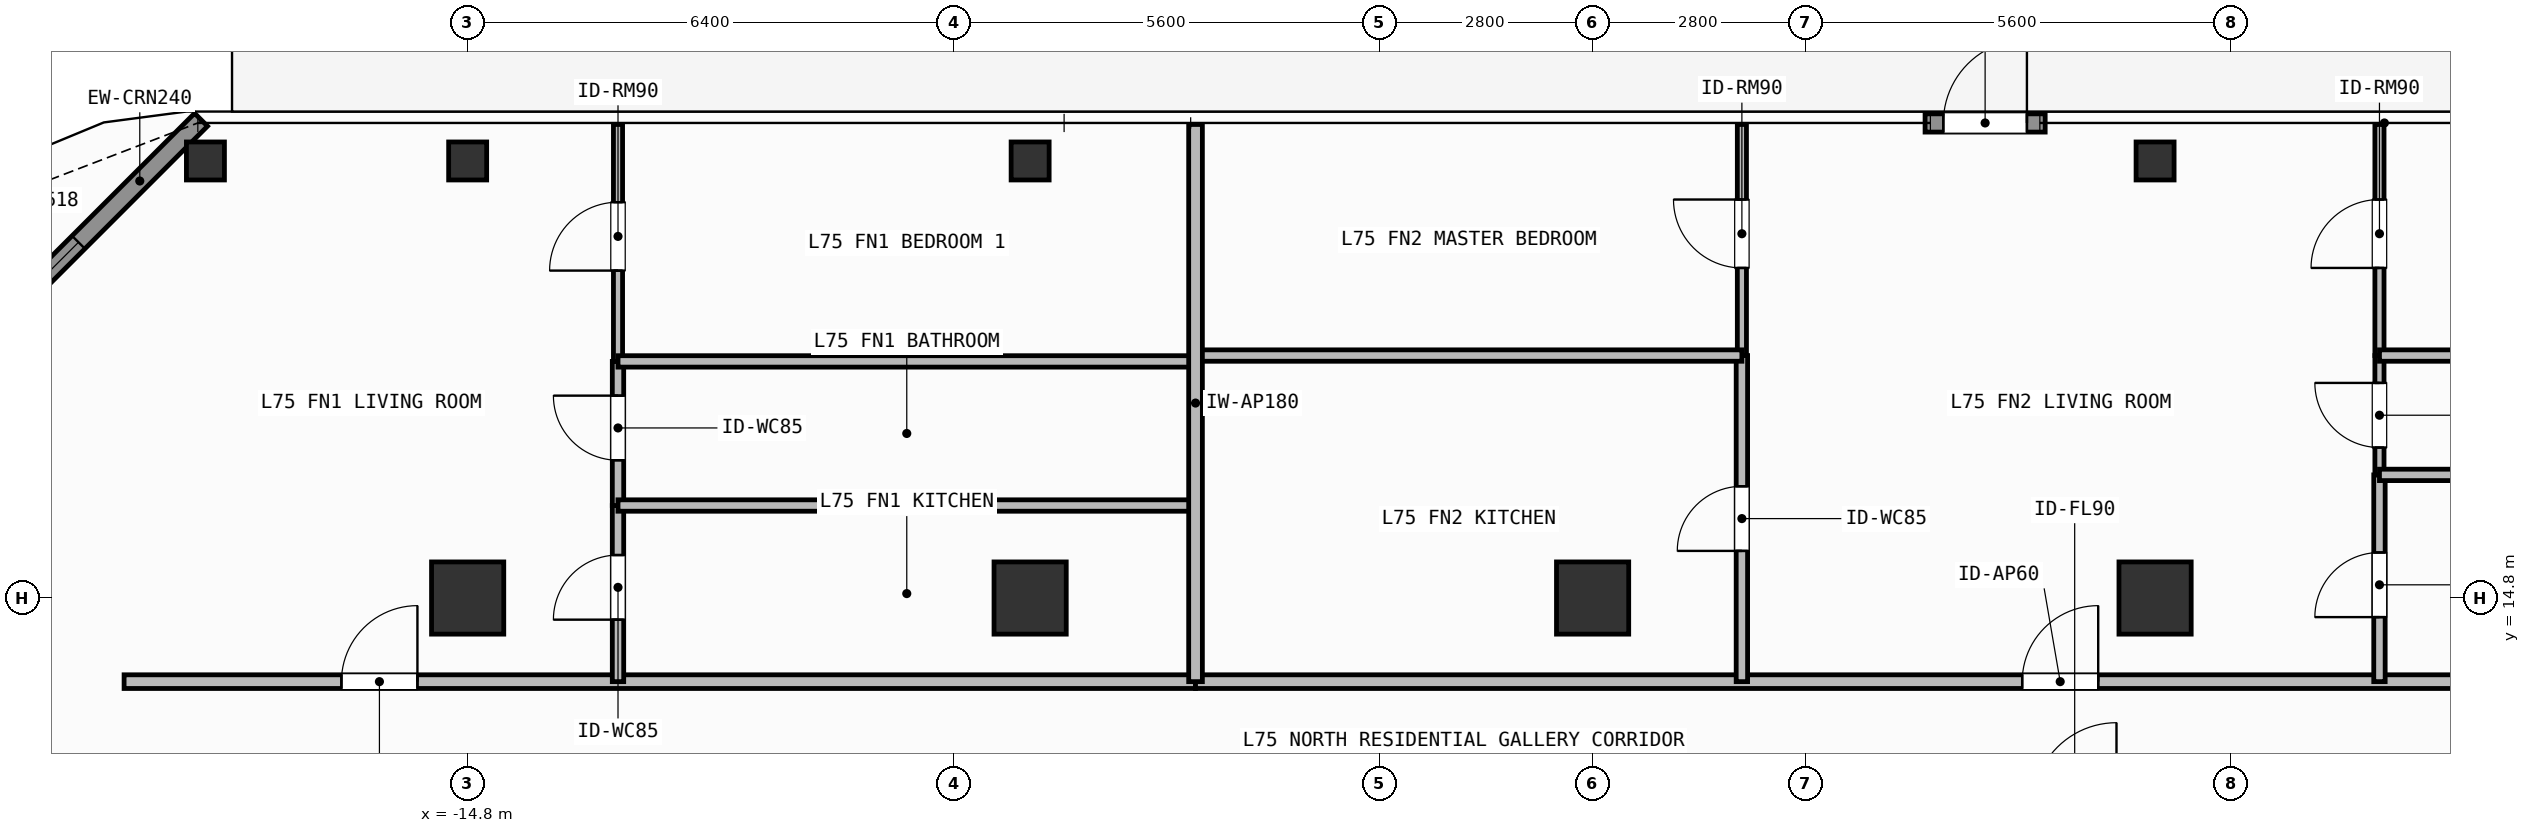
"""IFC4 building model, lengths in metres.
Left out: names, types, materials, properties, quantities, classifications, styles, units other than length and angle.
Written with IfcOpenShell. Run it as: python <this file> out.ifc"""

import sys

from ifc_helpers import new_model, si_unit, direction, frame, frame_2d, origin, origin_2d, place, context, subcontext, project, spatial, rectangle, hollow_rectangle, extrude, element, fill, save


model = new_model("IFC4")
c1 = context("Model", 3, precision=1e-05, world=origin(), true_north=direction((0.0, 1.0)))
c2 = subcontext(c1, "Body", "Model", "MODEL_VIEW")
j1 = project(units=[si_unit("LENGTHUNIT", "METRE"), si_unit("PLANEANGLEUNIT", "RADIAN")], contexts=[c1])
p1 = place(None, origin())
s1 = spatial("IfcSite", under=j1, at=p1, CompositionType="ELEMENT")
p2 = place(p1, origin())
s2 = spatial("IfcBuilding", under=s1, at=p2, CompositionType="ELEMENT")
p3 = place(p2, frame((0.0, 0.0, 305.4)))
s3 = spatial("IfcBuildingStorey", under=s2, at=p3, CompositionType="ELEMENT", Elevation=305.4)
for number, where, z_axis, x_axis in (
    (1, (-14.8, 14.8, 0.0), (0.0, 0.0, 1.0), (1.0, 0.0, 0.0)),
    (2, (-7.4, 14.8, 0.0), (0.0, 0.0, 1.0), (1.0, 0.0, 0.0)),
    (3, (0.0, 14.8, 0.0), (0.0, 0.0, 1.0), (1.0, 0.0, 0.0)),
    (4, (7.4, 14.8, 0.0), (0.0, 0.0, 1.0), (1.0, 0.0, 0.0)),
):
    element("IfcColumn", number, at=place(p3, frame(where, z_axis=z_axis, x_axis=x_axis)), inside=s3, PredefinedType="COLUMN", context=c2, shape_type="SweptSolid", body=[
        extrude(rectangle(XDim=0.95, YDim=0.95, at=origin_2d()), origin(), (0.0, 0.0, 1.0), 3.9),
    ])
for number, where, z_axis, x_axis in (
    (5, (-18.25, 20.55, 0.0), (0.0, 0.0, 1.0), (1.0, 0.0, 0.0)),
    (6, (-14.8, 20.55, 0.0), (0.0, 0.0, 1.0), (1.0, 0.0, 0.0)),
    (7, (-7.4, 20.55, 0.0), (0.0, 0.0, 1.0), (1.0, 0.0, 0.0)),
    (8, (7.4, 20.55, 0.0), (0.0, 0.0, 1.0), (1.0, 0.0, 0.0)),
):
    element("IfcColumn", number, at=place(p3, frame(where, z_axis=z_axis, x_axis=x_axis)), inside=s3, PredefinedType="COLUMN", context=c2, shape_type="SweptSolid", body=[
        extrude(hollow_rectangle(XDim=0.5, YDim=0.5, WallThickness=0.025, at=origin_2d()), origin(), (0.0, 0.0, 1.0), 3.9),
    ])
p4 = place(p3, frame((4.374, 21.05, 0.0), z_axis=(0.0, 0.0, 1.0), x_axis=(1.0, 0.0, 0.0)))
e9 = element("IfcWall", 9, at=p4, inside=s3, PredefinedType="SOLIDWALL", context=c2, shape_type="SweptSolid", body=[
    extrude(rectangle(XDim=1.58, YDim=0.24, at=frame_2d((0.79, 0.0))), origin(), (0.0, 0.0, 1.0), 3.68),
])
p5 = place(p4, frame((0.24, 0.0, 0.0)))
e10 = element("IfcOpeningElement", 10, at=p5, cuts=e9, PredefinedType="OPENING", context=c2, shape_type="SweptSolid", body=[
    extrude(rectangle(XDim=1.1, YDim=2.2, at=frame_2d((0.55, 1.1))), frame((0.0, 0.13, 0.0), z_axis=(0.0, -1.0, 0.0), x_axis=(1.0, 0.0, 0.0)), (0.0, 0.0, 1.0), 0.26),
])
p6 = place(p3, frame((-22.592, 16.808, 0.0), z_axis=(0.0, 0.0, 1.0), x_axis=(0.707106781187, 0.707106781187, 0.0)))
e11 = element("IfcWall", 11, at=p6, inside=s3, PredefinedType="SOLIDWALL", context=c2, shape_type="SweptSolid", body=[
    extrude(rectangle(XDim=6.059, YDim=0.24, at=frame_2d((3.03, 0.0))), origin(), (0.0, 0.0, 1.0), 3.68),
])
p7 = place(p6, frame((2.28, 0.0, 0.8)))
e12 = element("IfcOpeningElement", 12, at=p7, cuts=e11, PredefinedType="OPENING", context=c2, shape_type="SweptSolid", body=[
    extrude(rectangle(XDim=1.5, YDim=1.85, at=frame_2d((0.75, 0.925))), frame((0.0, 0.13, 0.0), z_axis=(0.0, -1.0, 0.0), x_axis=(1.0, 0.0, 0.0)), (0.0, 0.0, 1.0), 0.26),
])
p8 = place(p3, frame((-19.32, 13.7, 0.0), z_axis=(0.0, 0.0, 1.0), x_axis=(1.0, 0.0, 0.0)))
e13 = element("IfcWall", 13, at=p8, inside=s3, PredefinedType="PARTITIONING", context=c2, shape_type="SweptSolid", body=[
    extrude(rectangle(XDim=14.096, YDim=0.18, at=frame_2d((7.048, 0.0))), origin(), (0.0, 0.0, 1.0), 3.68),
])
p9 = place(p8, frame((2.859, 0.0, 0.0)))
e14 = element("IfcOpeningElement", 14, at=p9, cuts=e13, PredefinedType="OPENING", context=c2, shape_type="SweptSolid", body=[
    extrude(rectangle(XDim=1.0, YDim=2.2, at=frame_2d((0.5, 1.1))), frame((0.0, 0.1, 0.0), z_axis=(0.0, -1.0, 0.0), x_axis=(1.0, 0.0, 0.0)), (0.0, 0.0, 1.0), 0.2),
])
p10 = place(p3, frame((-12.822, 13.7, 0.0), z_axis=(0.0, 0.0, 1.0), x_axis=(0.0, 1.0, 0.0)))
e15 = element("IfcWall", 15, at=p10, inside=s3, PredefinedType="PARTITIONING", context=c2, shape_type="SweptSolid", body=[
    extrude(rectangle(XDim=2.317, YDim=0.15, at=frame_2d((1.159, 0.0))), origin(), (0.0, 0.0, 1.0), 3.68),
])
p11 = place(p10, frame((0.815, 0.0, 0.0)))
e16 = element("IfcOpeningElement", 16, at=p11, cuts=e15, PredefinedType="OPENING", context=c2, shape_type="SweptSolid", body=[
    extrude(rectangle(XDim=0.85, YDim=2.1, at=frame_2d((0.425, 1.05))), frame((0.0, 0.085, 0.0), z_axis=(0.0, -1.0, 0.0), x_axis=(1.0, 0.0, 0.0)), (0.0, 0.0, 1.0), 0.17),
])
p12 = place(p3, frame((-12.822, 16.017, 0.0), z_axis=(0.0, 0.0, 1.0), x_axis=(0.0, 1.0, 0.0)))
e17 = element("IfcWall", 17, at=p12, inside=s3, PredefinedType="PARTITIONING", context=c2, shape_type="SweptSolid", body=[
    extrude(rectangle(XDim=1.896, YDim=0.15, at=frame_2d((0.948, 0.0))), origin(), (0.0, 0.0, 1.0), 3.68),
])
p13 = place(p12, frame((0.596, 0.0, 0.0)))
e18 = element("IfcOpeningElement", 18, at=p13, cuts=e17, PredefinedType="OPENING", context=c2, shape_type="SweptSolid", body=[
    extrude(rectangle(XDim=0.85, YDim=2.1, at=frame_2d((0.425, 1.05))), frame((0.0, 0.085, 0.0), z_axis=(0.0, -1.0, 0.0), x_axis=(1.0, 0.0, 0.0)), (0.0, 0.0, 1.0), 0.17),
])
p14 = place(p3, frame((-12.822, 17.913, 0.0), z_axis=(0.0, 0.0, 1.0), x_axis=(0.0, 1.0, 0.0)))
e19 = element("IfcWall", 19, at=p14, inside=s3, PredefinedType="PARTITIONING", context=c2, shape_type="SweptSolid", body=[
    extrude(rectangle(XDim=3.117, YDim=0.12, at=frame_2d((1.559, 0.0))), origin(), (0.0, 0.0, 1.0), 3.68),
])
p15 = place(p14, frame((1.195, 0.0, 0.0)))
e20 = element("IfcOpeningElement", 20, at=p15, cuts=e19, PredefinedType="OPENING", context=c2, shape_type="SweptSolid", body=[
    extrude(rectangle(XDim=0.9, YDim=2.1, at=frame_2d((0.45, 1.05))), frame((0.0, 0.07, 0.0), z_axis=(0.0, -1.0, 0.0), x_axis=(1.0, 0.0, 0.0)), (0.0, 0.0, 1.0), 0.14),
])
p16 = place(p3, frame((-5.224, 13.7, 0.0), z_axis=(0.0, 0.0, 1.0), x_axis=(1.0, 0.0, 0.0)))
e21 = element("IfcWall", 21, at=p16, inside=s3, PredefinedType="PARTITIONING", context=c2, shape_type="SweptSolid", body=[
    extrude(rectangle(XDim=21.144, YDim=0.18, at=frame_2d((10.572, 0.0))), origin(), (0.0, 0.0, 1.0), 3.68),
])
p17 = place(p16, frame((10.876, 0.0, 0.0)))
e22 = element("IfcOpeningElement", 22, at=p17, cuts=e21, PredefinedType="OPENING", context=c2, shape_type="SweptSolid", body=[
    extrude(rectangle(XDim=1.0, YDim=2.2, at=frame_2d((0.5, 1.1))), frame((0.0, 0.1, 0.0), z_axis=(0.0, -1.0, 0.0), x_axis=(1.0, 0.0, 0.0)), (0.0, 0.0, 1.0), 0.2),
])
p18 = place(p3, frame((1.964, 13.7, 0.0), z_axis=(0.0, 0.0, 1.0), x_axis=(0.0, 1.0, 0.0)))
e23 = element("IfcWall", 23, at=p18, inside=s3, PredefinedType="PARTITIONING", context=c2, shape_type="SweptSolid", body=[
    extrude(rectangle(XDim=4.29, YDim=0.15, at=frame_2d((2.145, 0.0))), origin(), (0.0, 0.0, 1.0), 3.68),
])
p19 = place(p18, frame((1.72, 0.0, 0.0)))
e24 = element("IfcOpeningElement", 24, at=p19, cuts=e23, PredefinedType="OPENING", context=c2, shape_type="SweptSolid", body=[
    extrude(rectangle(XDim=0.85, YDim=2.1, at=frame_2d((0.425, 1.05))), frame((0.0, 0.085, 0.0), z_axis=(0.0, -1.0, 0.0), x_axis=(1.0, 0.0, 0.0)), (0.0, 0.0, 1.0), 0.17),
])
p20 = place(p3, frame((1.964, 17.99, 0.0), z_axis=(0.0, 0.0, 1.0), x_axis=(0.0, 1.0, 0.0)))
e25 = element("IfcWall", 25, at=p20, inside=s3, PredefinedType="PARTITIONING", context=c2, shape_type="SweptSolid", body=[
    extrude(rectangle(XDim=3.04, YDim=0.12, at=frame_2d((1.52, 0.0))), origin(), (0.0, 0.0, 1.0), 3.68),
])
p21 = place(p20, frame((1.153, 0.0, 0.0)))
e26 = element("IfcOpeningElement", 26, at=p21, cuts=e25, PredefinedType="OPENING", context=c2, shape_type="SweptSolid", body=[
    extrude(rectangle(XDim=0.9, YDim=2.1, at=frame_2d((0.45, 1.05))), frame((0.0, 0.07, 0.0), z_axis=(0.0, -1.0, 0.0), x_axis=(1.0, 0.0, 0.0)), (0.0, 0.0, 1.0), 0.14),
])
p22 = place(p3, frame((10.352, 13.7, 0.0), z_axis=(0.0, 0.0, 1.0), x_axis=(0.0, 1.0, 0.0)))
e27 = element("IfcWall", 27, at=p22, inside=s3, PredefinedType="PARTITIONING", context=c2, shape_type="SweptSolid", body=[
    extrude(rectangle(XDim=2.72, YDim=0.15, at=frame_2d((1.36, 0.0))), origin(), (0.0, 0.0, 1.0), 3.68),
])
p23 = place(p22, frame((0.849, 0.0, 0.0)))
e28 = element("IfcOpeningElement", 28, at=p23, cuts=e27, PredefinedType="OPENING", context=c2, shape_type="SweptSolid", body=[
    extrude(rectangle(XDim=0.85, YDim=2.1, at=frame_2d((0.425, 1.05))), frame((0.0, 0.085, 0.0), z_axis=(0.0, -1.0, 0.0), x_axis=(1.0, 0.0, 0.0)), (0.0, 0.0, 1.0), 0.17),
])
p24 = place(p3, frame((10.352, 16.42, 0.0), z_axis=(0.0, 0.0, 1.0), x_axis=(0.0, 1.0, 0.0)))
e29 = element("IfcWall", 29, at=p24, inside=s3, PredefinedType="PARTITIONING", context=c2, shape_type="SweptSolid", body=[
    extrude(rectangle(XDim=1.57, YDim=0.12, at=frame_2d((0.785, 0.0))), origin(), (0.0, 0.0, 1.0), 3.68),
])
p25 = place(p24, frame((0.36, 0.0, 0.0)))
e30 = element("IfcOpeningElement", 30, at=p25, cuts=e29, PredefinedType="OPENING", context=c2, shape_type="SweptSolid", body=[
    extrude(rectangle(XDim=0.85, YDim=2.1, at=frame_2d((0.425, 1.05))), frame((0.0, 0.07, 0.0), z_axis=(0.0, -1.0, 0.0), x_axis=(1.0, 0.0, 0.0)), (0.0, 0.0, 1.0), 0.14),
])
p26 = place(p3, frame((10.352, 17.99, 0.0), z_axis=(0.0, 0.0, 1.0), x_axis=(0.0, 1.0, 0.0)))
e31 = element("IfcWall", 31, at=p26, inside=s3, PredefinedType="PARTITIONING", context=c2, shape_type="SweptSolid", body=[
    extrude(rectangle(XDim=3.04, YDim=0.12, at=frame_2d((1.52, 0.0))), origin(), (0.0, 0.0, 1.0), 3.68),
])
p27 = place(p26, frame((1.153, 0.0, 0.0)))
e32 = element("IfcOpeningElement", 32, at=p27, cuts=e31, PredefinedType="OPENING", context=c2, shape_type="SweptSolid", body=[
    extrude(rectangle(XDim=0.9, YDim=2.1, at=frame_2d((0.45, 1.05))), frame((0.0, 0.07, 0.0), z_axis=(0.0, -1.0, 0.0), x_axis=(1.0, 0.0, 0.0)), (0.0, 0.0, 1.0), 0.14),
])
for number, where, z_axis, x_axis in (
    (33, (-12.822, 16.017, 0.0), (0.0, 0.0, 1.0), (1.0, 0.0, 0.0)),
    (34, (-12.822, 17.913, 0.0), (0.0, 0.0, 1.0), (1.0, 0.0, 0.0)),
):
    element("IfcWall", number, at=place(p3, frame(where, z_axis=z_axis, x_axis=x_axis)), inside=s3, PredefinedType="PARTITIONING", context=c2, shape_type="SweptSolid", body=[
        extrude(rectangle(XDim=7.598, YDim=0.15, at=frame_2d((3.799, 0.0))), origin(), (0.0, 0.0, 1.0), 3.68),
    ])
p28 = place(p3, frame((-5.224, 17.99, 0.0), z_axis=(0.0, 0.0, 1.0), x_axis=(1.0, 0.0, 0.0)))
e35 = element("IfcWall", 35, at=p28, inside=s3, PredefinedType="PARTITIONING", context=c2, shape_type="SweptSolid", body=[
    extrude(rectangle(XDim=7.188, YDim=0.15, at=frame_2d((3.594, 0.0))), origin(), (0.0, 0.0, 1.0), 3.68),
])
for number, where, z_axis, x_axis in (
    (36, (10.352, 16.42, 0.0), (0.0, 0.0, 1.0), (1.0, 0.0, 0.0)),
    (37, (10.352, 17.99, 0.0), (0.0, 0.0, 1.0), (1.0, 0.0, 0.0)),
):
    element("IfcWall", number, at=place(p3, frame(where, z_axis=z_axis, x_axis=x_axis)), inside=s3, PredefinedType="PARTITIONING", context=c2, shape_type="SweptSolid", body=[
        extrude(rectangle(XDim=5.568, YDim=0.15, at=frame_2d((2.784, 0.0))), origin(), (0.0, 0.0, 1.0), 3.68),
    ])
p29 = place(p3, frame((-5.224, 13.7, 0.0), z_axis=(0.0, 0.0, 1.0), x_axis=(0.0, 1.0, 0.0)))
e38 = element("IfcWall", 38, at=p29, inside=s3, PredefinedType="PARTITIONING", context=c2, shape_type="SweptSolid", body=[
    extrude(rectangle(XDim=7.33, YDim=0.18, at=frame_2d((3.665, 0.0))), origin(), (0.0, 0.0, 1.0), 3.68),
])
p30 = place(p5, origin())
e39 = element("IfcDoor", 39, at=p30, inside=s3, OperationType="SINGLE_SWING_RIGHT", PredefinedType="DOOR", context=c2, shape_type="SweptSolid", body=[
    extrude(rectangle(XDim=1.1, YDim=2.2, at=frame_2d((0.55, 1.1))), frame((0.0, 0.025, 0.0), z_axis=(0.0, -1.0, 0.0), x_axis=(1.0, 0.0, 0.0)), (0.0, 0.0, 1.0), 0.05),
])
fill(e10, e39)
p31 = place(p7, origin())
e40 = element("IfcWindow", 40, at=p31, inside=s3, PartitioningType="SINGLE_PANEL", PredefinedType="WINDOW", context=c2, shape_type="SweptSolid", body=[
    extrude(rectangle(XDim=1.5, YDim=1.85, at=frame_2d((0.75, 0.925))), frame((0.0, 0.03, 0.0), z_axis=(0.0, -1.0, 0.0), x_axis=(1.0, 0.0, 0.0)), (0.0, 0.0, 1.0), 0.06),
])
fill(e12, e40)
p32 = place(p9, origin())
e41 = element("IfcDoor", 41, at=p32, inside=s3, OperationType="SINGLE_SWING_RIGHT", PredefinedType="DOOR", context=c2, shape_type="SweptSolid", body=[
    extrude(rectangle(XDim=1.0, YDim=2.2, at=frame_2d((0.5, 1.1))), frame((0.0, 0.025, 0.0), z_axis=(0.0, -1.0, 0.0), x_axis=(1.0, 0.0, 0.0)), (0.0, 0.0, 1.0), 0.05),
])
fill(e14, e41)
p33 = place(p11, origin())
e42 = element("IfcDoor", 42, at=p33, inside=s3, OperationType="SINGLE_SWING_LEFT", PredefinedType="DOOR", context=c2, shape_type="SweptSolid", body=[
    extrude(rectangle(XDim=0.85, YDim=2.1, at=frame_2d((0.425, 1.05))), frame((0.0, 0.025, 0.0), z_axis=(0.0, -1.0, 0.0), x_axis=(1.0, 0.0, 0.0)), (0.0, 0.0, 1.0), 0.05),
])
fill(e16, e42)
p34 = place(p13, origin())
e43 = element("IfcDoor", 43, at=p34, inside=s3, OperationType="SINGLE_SWING_RIGHT", PredefinedType="DOOR", context=c2, shape_type="SweptSolid", body=[
    extrude(rectangle(XDim=0.85, YDim=2.1, at=frame_2d((0.425, 1.05))), frame((0.0, 0.025, 0.0), z_axis=(0.0, -1.0, 0.0), x_axis=(1.0, 0.0, 0.0)), (0.0, 0.0, 1.0), 0.05),
])
fill(e18, e43)
p35 = place(p15, origin())
e44 = element("IfcDoor", 44, at=p35, inside=s3, OperationType="SINGLE_SWING_LEFT", PredefinedType="DOOR", context=c2, shape_type="SweptSolid", body=[
    extrude(rectangle(XDim=0.9, YDim=2.1, at=frame_2d((0.45, 1.05))), frame((0.0, 0.025, 0.0), z_axis=(0.0, -1.0, 0.0), x_axis=(1.0, 0.0, 0.0)), (0.0, 0.0, 1.0), 0.05),
])
fill(e20, e44)
p36 = place(p17, origin())
e45 = element("IfcDoor", 45, at=p36, inside=s3, OperationType="SINGLE_SWING_RIGHT", PredefinedType="DOOR", context=c2, shape_type="SweptSolid", body=[
    extrude(rectangle(XDim=1.0, YDim=2.2, at=frame_2d((0.5, 1.1))), frame((0.0, 0.025, 0.0), z_axis=(0.0, -1.0, 0.0), x_axis=(1.0, 0.0, 0.0)), (0.0, 0.0, 1.0), 0.05),
])
fill(e22, e45)
p37 = place(p19, origin())
e46 = element("IfcDoor", 46, at=p37, inside=s3, OperationType="SINGLE_SWING_LEFT", PredefinedType="DOOR", context=c2, shape_type="SweptSolid", body=[
    extrude(rectangle(XDim=0.85, YDim=2.1, at=frame_2d((0.425, 1.05))), frame((0.0, 0.025, 0.0), z_axis=(0.0, -1.0, 0.0), x_axis=(1.0, 0.0, 0.0)), (0.0, 0.0, 1.0), 0.05),
])
fill(e24, e46)
p38 = place(p21, origin())
e47 = element("IfcDoor", 47, at=p38, inside=s3, OperationType="SINGLE_SWING_RIGHT", PredefinedType="DOOR", context=c2, shape_type="SweptSolid", body=[
    extrude(rectangle(XDim=0.9, YDim=2.1, at=frame_2d((0.45, 1.05))), frame((0.0, 0.025, 0.0), z_axis=(0.0, -1.0, 0.0), x_axis=(1.0, 0.0, 0.0)), (0.0, 0.0, 1.0), 0.05),
])
fill(e26, e47)
p39 = place(p23, origin())
e48 = element("IfcDoor", 48, at=p39, inside=s3, OperationType="SINGLE_SWING_LEFT", PredefinedType="DOOR", context=c2, shape_type="SweptSolid", body=[
    extrude(rectangle(XDim=0.85, YDim=2.1, at=frame_2d((0.425, 1.05))), frame((0.0, 0.025, 0.0), z_axis=(0.0, -1.0, 0.0), x_axis=(1.0, 0.0, 0.0)), (0.0, 0.0, 1.0), 0.05),
])
fill(e28, e48)
p40 = place(p25, origin())
e49 = element("IfcDoor", 49, at=p40, inside=s3, OperationType="SINGLE_SWING_RIGHT", PredefinedType="DOOR", context=c2, shape_type="SweptSolid", body=[
    extrude(rectangle(XDim=0.85, YDim=2.1, at=frame_2d((0.425, 1.05))), frame((0.0, 0.025, 0.0), z_axis=(0.0, -1.0, 0.0), x_axis=(1.0, 0.0, 0.0)), (0.0, 0.0, 1.0), 0.05),
])
fill(e30, e49)
p41 = place(p27, origin())
e50 = element("IfcDoor", 50, at=p41, inside=s3, OperationType="SINGLE_SWING_LEFT", PredefinedType="DOOR", context=c2, shape_type="SweptSolid", body=[
    extrude(rectangle(XDim=0.9, YDim=2.1, at=frame_2d((0.45, 1.05))), frame((0.0, 0.025, 0.0), z_axis=(0.0, -1.0, 0.0), x_axis=(1.0, 0.0, 0.0)), (0.0, 0.0, 1.0), 0.05),
])
fill(e32, e50)
save(model, sys.argv[1])
